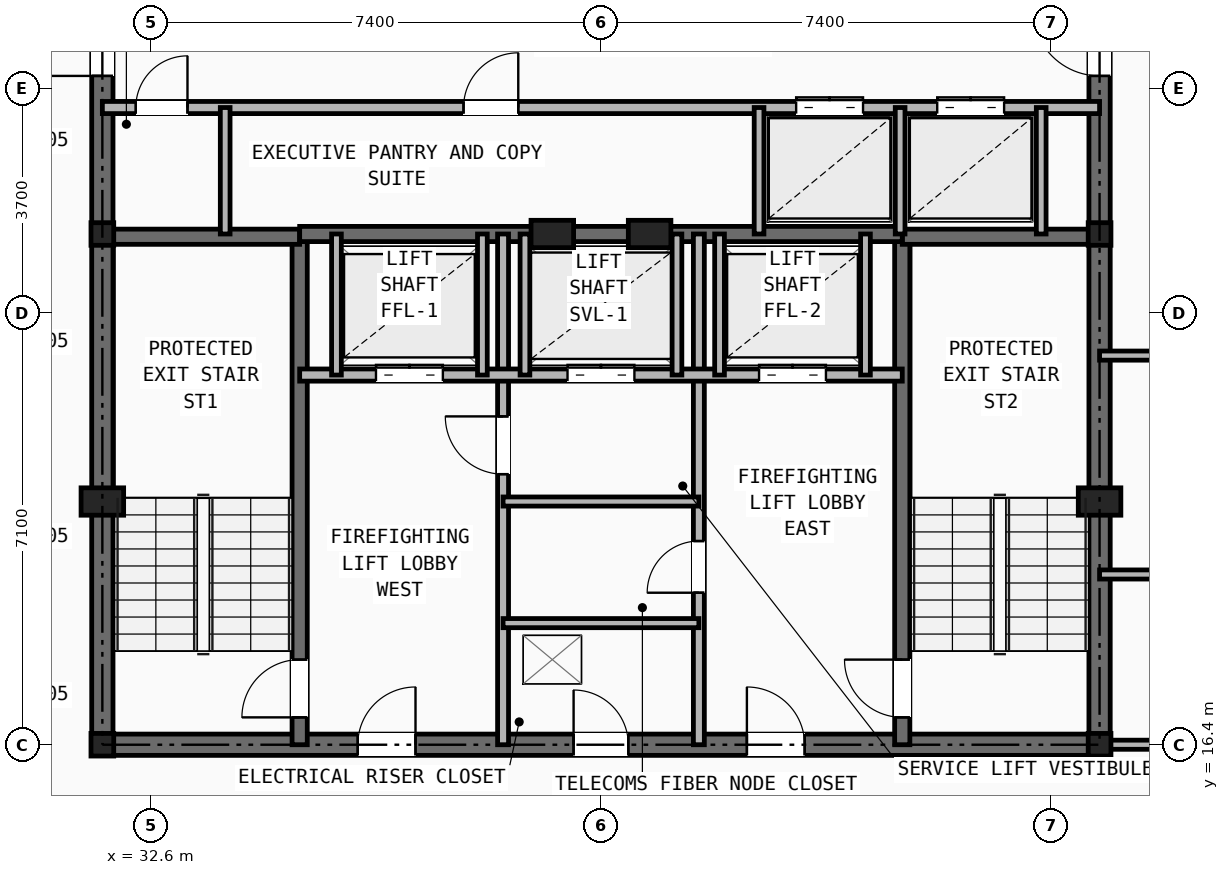
"""IFC4 building model, lengths in metres.
Left out: names, types, materials, properties, quantities, classifications, styles, units other than length and angle.
Written with IfcOpenShell. Run it as: python <this file> out.ifc"""

import sys

from ifc_helpers import new_model, si_unit, direction, frame, frame_2d, origin, origin_2d, place, context, subcontext, project, spatial, rectangle, i_section, extrude, element, fill, save


model = new_model("IFC4")
c1 = context("Model", 3, precision=1e-05, world=origin(), true_north=direction((0.0, 1.0)))
c2 = subcontext(c1, "Body", "Model", "MODEL_VIEW")
j1 = project(units=[si_unit("LENGTHUNIT", "METRE"), si_unit("PLANEANGLEUNIT", "RADIAN")], contexts=[c1])
p1 = place(None, origin())
s1 = spatial("IfcSite", under=j1, at=p1, CompositionType="ELEMENT")
p2 = place(p1, origin())
s2 = spatial("IfcBuilding", under=s1, at=p2, CompositionType="ELEMENT")
p3 = place(p2, frame((0.0, 0.0, 258.5)))
s3 = spatial("IfcBuildingStorey", under=s2, at=p3, CompositionType="ELEMENT", Elevation=258.5)
for number, where, z_axis, x_axis in (
    (1, (31.8, 16.4, 0.0), (0.0, 0.0, 1.0), (1.0, 0.0, 0.0)),
    (2, (48.2, 16.4, 0.0), (0.0, 0.0, 1.0), (1.0, 0.0, 0.0)),
    (3, (31.8, 24.8, 0.0), (0.0, 0.0, 1.0), (1.0, 0.0, 0.0)),
    (4, (48.2, 24.8, 0.0), (0.0, 0.0, 1.0), (1.0, 0.0, 0.0)),
):
    element("IfcColumn", number, at=place(p3, frame(where, z_axis=z_axis, x_axis=x_axis)), inside=s3, PredefinedType="COLUMN", context=c2, shape_type="SweptSolid", body=[
        extrude(i_section(OverallWidth=0.374, OverallDepth=0.372, WebThickness=0.016, FlangeThickness=0.026, at=origin_2d()), origin(), (0.0, 0.0, 1.0), 3.5),
    ])
for number, where, z_axis, x_axis in (
    (5, (31.8, 20.4, 0.0), (0.0, 0.0, 1.0), (1.0, 0.0, 0.0)),
    (6, (48.2, 20.4, 0.0), (0.0, 0.0, 1.0), (1.0, 0.0, 0.0)),
    (7, (39.2, 24.8, 0.0), (0.0, 0.0, 1.0), (1.0, 0.0, 0.0)),
    (8, (40.8, 24.8, 0.0), (0.0, 0.0, 1.0), (1.0, 0.0, 0.0)),
):
    element("IfcColumn", number, at=place(p3, frame(where, z_axis=z_axis, x_axis=x_axis)), inside=s3, PredefinedType="PILASTER", context=c2, shape_type="SweptSolid", body=[
        extrude(rectangle(XDim=0.7, YDim=0.45, at=origin_2d()), origin(), (0.0, 0.0, 1.0), 3.5),
    ])
p4 = place(p3, frame((31.8, 16.4, 0.0), z_axis=(0.0, 0.0, 1.0), x_axis=(1.0, 0.0, 0.0)))
e9 = element("IfcWall", 9, at=p4, inside=s3, PredefinedType="SHEAR", context=c2, shape_type="SweptSolid", body=[
    extrude(rectangle(XDim=16.4, YDim=0.35, at=frame_2d((8.2, 0.0))), origin(), (0.0, 0.0, 1.0), 3.25),
])
p5 = place(p4, frame((7.75, 0.0, 0.0)))
e10 = element("IfcOpeningElement", 10, at=p5, cuts=e9, PredefinedType="OPENING", context=c2, shape_type="SweptSolid", body=[
    extrude(rectangle(XDim=0.9, YDim=2.1, at=frame_2d((0.45, 1.05))), frame((0.0, 0.185, 0.0), z_axis=(0.0, -1.0, 0.0), x_axis=(1.0, 0.0, 0.0)), (0.0, 0.0, 1.0), 0.37),
])
p6 = place(p4, frame((4.2, 0.0, 0.0)))
e11 = element("IfcOpeningElement", 11, at=p6, cuts=e9, PredefinedType="OPENING", context=c2, shape_type="SweptSolid", body=[
    extrude(rectangle(XDim=0.95, YDim=2.1, at=frame_2d((0.475, 1.05))), frame((0.0, 0.185, 0.0), z_axis=(0.0, -1.0, 0.0), x_axis=(1.0, 0.0, 0.0)), (0.0, 0.0, 1.0), 0.37),
])
p7 = place(p4, frame((10.6, 0.0, 0.0)))
e12 = element("IfcOpeningElement", 12, at=p7, cuts=e9, PredefinedType="OPENING", context=c2, shape_type="SweptSolid", body=[
    extrude(rectangle(XDim=0.95, YDim=2.1, at=frame_2d((0.475, 1.05))), frame((0.0, 0.185, 0.0), z_axis=(0.0, -1.0, 0.0), x_axis=(1.0, 0.0, 0.0)), (0.0, 0.0, 1.0), 0.37),
])
p8 = place(p3, frame((31.8, 16.4, 0.0), z_axis=(0.0, 0.0, 1.0), x_axis=(0.0, 1.0, 0.0)))
e13 = element("IfcWall", 13, at=p8, inside=s3, PredefinedType="SHEAR", context=c2, shape_type="SweptSolid", body=[
    extrude(rectangle(XDim=14.8, YDim=0.35, at=frame_2d((7.4, 0.0))), origin(), (0.0, 0.0, 1.0), 3.25),
])
p9 = place(p8, frame((11.0, 0.0, 0.0)))
e14 = element("IfcOpeningElement", 14, at=p9, cuts=e13, PredefinedType="OPENING", context=c2, shape_type="SweptSolid", body=[
    extrude(rectangle(XDim=1.1, YDim=2.15, at=frame_2d((0.55, 1.075))), frame((0.0, 0.185, 0.0), z_axis=(0.0, -1.0, 0.0), x_axis=(1.0, 0.0, 0.0)), (0.0, 0.0, 1.0), 0.37),
])
p10 = place(p3, frame((48.2, 16.4, 0.0), z_axis=(0.0, 0.0, 1.0), x_axis=(0.0, 1.0, 0.0)))
e15 = element("IfcWall", 15, at=p10, inside=s3, PredefinedType="SHEAR", context=c2, shape_type="SweptSolid", body=[
    extrude(rectangle(XDim=14.8, YDim=0.35, at=frame_2d((7.4, 0.0))), origin(), (0.0, 0.0, 1.0), 3.25),
])
p11 = place(p10, frame((11.0, 0.0, 0.0)))
e16 = element("IfcOpeningElement", 16, at=p11, cuts=e15, PredefinedType="OPENING", context=c2, shape_type="SweptSolid", body=[
    extrude(rectangle(XDim=1.1, YDim=2.15, at=frame_2d((0.55, 1.075))), frame((0.0, 0.185, 0.0), z_axis=(0.0, -1.0, 0.0), x_axis=(1.0, 0.0, 0.0)), (0.0, 0.0, 1.0), 0.37),
])
p12 = place(p3, frame((35.045, 16.4, 0.0), z_axis=(0.0, 0.0, 1.0), x_axis=(0.0, 1.0, 0.0)))
e17 = element("IfcWall", 17, at=p12, inside=s3, PredefinedType="SHEAR", context=c2, shape_type="SweptSolid", body=[
    extrude(rectangle(XDim=8.4, YDim=0.25, at=frame_2d((4.2, 0.0))), origin(), (0.0, 0.0, 1.0), 3.25),
])
p13 = place(p12, frame((0.45, 0.0, 0.0)))
e18 = element("IfcOpeningElement", 18, at=p13, cuts=e17, PredefinedType="OPENING", context=c2, shape_type="SweptSolid", body=[
    extrude(rectangle(XDim=0.95, YDim=2.1, at=frame_2d((0.475, 1.05))), frame((0.0, 0.135, 0.0), z_axis=(0.0, -1.0, 0.0), x_axis=(1.0, 0.0, 0.0)), (0.0, 0.0, 1.0), 0.27),
])
p14 = place(p3, frame((31.8, 24.755, 0.0), z_axis=(0.0, 0.0, 1.0), x_axis=(1.0, 0.0, 0.0)))
e19 = element("IfcWall", 19, at=p14, inside=s3, PredefinedType="SHEAR", context=c2, shape_type="SweptSolid", body=[
    extrude(rectangle(XDim=3.245, YDim=0.25, at=frame_2d((1.623, 0.0))), origin(), (0.0, 0.0, 1.0), 3.25),
])
p15 = place(p3, frame((44.955, 16.4, 0.0), z_axis=(0.0, 0.0, 1.0), x_axis=(0.0, 1.0, 0.0)))
e20 = element("IfcWall", 20, at=p15, inside=s3, PredefinedType="SHEAR", context=c2, shape_type="SweptSolid", body=[
    extrude(rectangle(XDim=8.4, YDim=0.25, at=frame_2d((4.2, 0.0))), origin(), (0.0, 0.0, 1.0), 3.25),
])
p16 = place(p15, frame((0.45, 0.0, 0.0)))
e21 = element("IfcOpeningElement", 21, at=p16, cuts=e20, PredefinedType="OPENING", context=c2, shape_type="SweptSolid", body=[
    extrude(rectangle(XDim=0.95, YDim=2.1, at=frame_2d((0.475, 1.05))), frame((0.0, 0.135, 0.0), z_axis=(0.0, -1.0, 0.0), x_axis=(1.0, 0.0, 0.0)), (0.0, 0.0, 1.0), 0.27),
])
p17 = place(p3, frame((44.955, 24.755, 0.0), z_axis=(0.0, 0.0, 1.0), x_axis=(1.0, 0.0, 0.0)))
e22 = element("IfcWall", 22, at=p17, inside=s3, PredefinedType="SHEAR", context=c2, shape_type="SweptSolid", body=[
    extrude(rectangle(XDim=3.245, YDim=0.25, at=frame_2d((1.623, 0.0))), origin(), (0.0, 0.0, 1.0), 3.25),
])
p18 = place(p3, frame((35.045, 24.8, 0.0), z_axis=(0.0, 0.0, 1.0), x_axis=(1.0, 0.0, 0.0)))
e23 = element("IfcWall", 23, at=p18, inside=s3, PredefinedType="SHEAR", context=c2, shape_type="SweptSolid", body=[
    extrude(rectangle(XDim=9.91, YDim=0.25, at=frame_2d((4.955, 0.0))), origin(), (0.0, 0.0, 1.0), 3.25),
])
p19 = place(p3, frame((38.39, 16.4, 0.0), z_axis=(0.0, 0.0, 1.0), x_axis=(0.0, 1.0, 0.0)))
e24 = element("IfcWall", 24, at=p19, inside=s3, PredefinedType="PARTITIONING", context=c2, shape_type="SweptSolid", body=[
    extrude(rectangle(XDim=8.4, YDim=0.18, at=frame_2d((4.2, 0.0))), origin(), (0.0, 0.0, 1.0), 2.705),
])
p20 = place(p19, frame((4.45, 0.0, 0.0)))
e25 = element("IfcOpeningElement", 25, at=p20, cuts=e24, PredefinedType="OPENING", context=c2, shape_type="SweptSolid", body=[
    extrude(rectangle(XDim=0.95, YDim=2.1, at=frame_2d((0.475, 1.05))), frame((0.0, 0.1, 0.0), z_axis=(0.0, -1.0, 0.0), x_axis=(1.0, 0.0, 0.0)), (0.0, 0.0, 1.0), 0.2),
])
p21 = place(p3, frame((41.61, 16.4, 0.0), z_axis=(0.0, 0.0, 1.0), x_axis=(0.0, 1.0, 0.0)))
e26 = element("IfcWall", 26, at=p21, inside=s3, PredefinedType="PARTITIONING", context=c2, shape_type="SweptSolid", body=[
    extrude(rectangle(XDim=8.4, YDim=0.18, at=frame_2d((4.2, 0.0))), origin(), (0.0, 0.0, 1.0), 2.705),
])
p22 = place(p21, frame((2.5, 0.0, 0.0)))
e27 = element("IfcOpeningElement", 27, at=p22, cuts=e26, PredefinedType="OPENING", context=c2, shape_type="SweptSolid", body=[
    extrude(rectangle(XDim=0.85, YDim=2.05, at=frame_2d((0.425, 1.025))), frame((0.0, 0.1, 0.0), z_axis=(0.0, -1.0, 0.0), x_axis=(1.0, 0.0, 0.0)), (0.0, 0.0, 1.0), 0.2),
])
p23 = place(p3, frame((35.045, 22.48, 0.0), z_axis=(0.0, 0.0, 1.0), x_axis=(1.0, 0.0, 0.0)))
e28 = element("IfcWall", 28, at=p23, inside=s3, PredefinedType="SOLIDWALL", context=c2, shape_type="SweptSolid", body=[
    extrude(rectangle(XDim=9.91, YDim=0.2, at=frame_2d((4.955, 0.0))), origin(), (0.0, 0.0, 1.0), 3.25),
])
p24 = place(p23, frame((1.255, 0.0, 0.0)))
e29 = element("IfcOpeningElement", 29, at=p24, cuts=e28, PredefinedType="OPENING", context=c2, shape_type="SweptSolid", body=[
    extrude(rectangle(XDim=1.1, YDim=2.15, at=frame_2d((0.55, 1.075))), frame((0.0, 0.11, 0.0), z_axis=(0.0, -1.0, 0.0), x_axis=(1.0, 0.0, 0.0)), (0.0, 0.0, 1.0), 0.22),
])
p25 = place(p23, frame((7.555, 0.0, 0.0)))
e30 = element("IfcOpeningElement", 30, at=p25, cuts=e28, PredefinedType="OPENING", context=c2, shape_type="SweptSolid", body=[
    extrude(rectangle(XDim=1.1, YDim=2.15, at=frame_2d((0.55, 1.075))), frame((0.0, 0.11, 0.0), z_axis=(0.0, -1.0, 0.0), x_axis=(1.0, 0.0, 0.0)), (0.0, 0.0, 1.0), 0.22),
])
p26 = place(p23, frame((4.405, 0.0, 0.0)))
e31 = element("IfcOpeningElement", 31, at=p26, cuts=e28, PredefinedType="OPENING", context=c2, shape_type="SweptSolid", body=[
    extrude(rectangle(XDim=1.1, YDim=2.15, at=frame_2d((0.55, 1.075))), frame((0.0, 0.11, 0.0), z_axis=(0.0, -1.0, 0.0), x_axis=(1.0, 0.0, 0.0)), (0.0, 0.0, 1.0), 0.22),
])
for number, where, z_axis, x_axis in (
    (32, (38.39, 18.4, 0.0), (0.0, 0.0, 1.0), (1.0, 0.0, 0.0)),
    (33, (38.39, 20.4, 0.0), (0.0, 0.0, 1.0), (1.0, 0.0, 0.0)),
):
    element("IfcWall", number, at=place(p3, frame(where, z_axis=z_axis, x_axis=x_axis)), inside=s3, PredefinedType="PARTITIONING", context=c2, shape_type="SweptSolid", body=[
        extrude(rectangle(XDim=3.22, YDim=0.15, at=frame_2d((1.61, 0.0))), origin(), (0.0, 0.0, 1.0), 3.25),
    ])
for number, where, z_axis, x_axis in (
    (34, (35.65, 22.48, 0.0), (0.0, 0.0, 1.0), (0.0, 1.0, 0.0)),
    (35, (38.05, 22.48, 0.0), (0.0, 0.0, 1.0), (0.0, 1.0, 0.0)),
    (36, (41.95, 22.48, 0.0), (0.0, 0.0, 1.0), (0.0, 1.0, 0.0)),
    (37, (44.35, 22.48, 0.0), (0.0, 0.0, 1.0), (0.0, 1.0, 0.0)),
    (38, (38.75, 22.48, 0.0), (0.0, 0.0, 1.0), (0.0, 1.0, 0.0)),
    (39, (41.25, 22.48, 0.0), (0.0, 0.0, 1.0), (0.0, 1.0, 0.0)),
):
    element("IfcWall", number, at=place(p3, frame(where, z_axis=z_axis, x_axis=x_axis)), inside=s3, PredefinedType="SOLIDWALL", context=c2, shape_type="SweptSolid", body=[
        extrude(rectangle(XDim=2.32, YDim=0.16, at=frame_2d((1.16, 0.0))), origin(), (0.0, 0.0, 1.0), 3.25),
    ])
p27 = place(p3, frame((31.8, 26.88, 0.0), z_axis=(0.0, 0.0, 1.0), x_axis=(1.0, 0.0, 0.0)))
e40 = element("IfcWall", 40, at=p27, inside=s3, PredefinedType="SOLIDWALL", context=c2, shape_type="SweptSolid", body=[
    extrude(rectangle(XDim=16.4, YDim=0.2, at=frame_2d((8.2, 0.0))), origin(), (0.0, 0.0, 1.0), 2.705),
])
p28 = place(p27, frame((0.55, 0.0, 0.0)))
e41 = element("IfcOpeningElement", 41, at=p28, cuts=e40, PredefinedType="OPENING", context=c2, shape_type="SweptSolid", body=[
    extrude(rectangle(XDim=0.85, YDim=2.05, at=frame_2d((0.425, 1.025))), frame((0.0, 0.11, 0.0), z_axis=(0.0, -1.0, 0.0), x_axis=(1.0, 0.0, 0.0)), (0.0, 0.0, 1.0), 0.22),
])
p29 = place(p27, frame((5.94, 0.0, 0.0)))
e42 = element("IfcOpeningElement", 42, at=p29, cuts=e40, PredefinedType="OPENING", context=c2, shape_type="SweptSolid", body=[
    extrude(rectangle(XDim=0.9, YDim=2.1, at=frame_2d((0.45, 1.05))), frame((0.0, 0.11, 0.0), z_axis=(0.0, -1.0, 0.0), x_axis=(1.0, 0.0, 0.0)), (0.0, 0.0, 1.0), 0.22),
])
p30 = place(p27, frame((11.41, 0.0, 0.0)))
e43 = element("IfcOpeningElement", 43, at=p30, cuts=e40, PredefinedType="OPENING", context=c2, shape_type="SweptSolid", body=[
    extrude(rectangle(XDim=1.1, YDim=2.15, at=frame_2d((0.55, 1.075))), frame((0.0, 0.11, 0.0), z_axis=(0.0, -1.0, 0.0), x_axis=(1.0, 0.0, 0.0)), (0.0, 0.0, 1.0), 0.22),
])
p31 = place(p27, frame((13.73, 0.0, 0.0)))
e44 = element("IfcOpeningElement", 44, at=p31, cuts=e40, PredefinedType="OPENING", context=c2, shape_type="SweptSolid", body=[
    extrude(rectangle(XDim=1.1, YDim=2.15, at=frame_2d((0.55, 1.075))), frame((0.0, 0.11, 0.0), z_axis=(0.0, -1.0, 0.0), x_axis=(1.0, 0.0, 0.0)), (0.0, 0.0, 1.0), 0.22),
])
for number, where, z_axis, x_axis in (
    (45, (33.82, 24.8, 0.0), (0.0, 0.0, 1.0), (0.0, 1.0, 0.0)),
    (46, (42.6, 24.8, 0.0), (0.0, 0.0, 1.0), (0.0, 1.0, 0.0)),
    (47, (44.92, 24.8, 0.0), (0.0, 0.0, 1.0), (0.0, 1.0, 0.0)),
    (48, (47.24, 24.8, 0.0), (0.0, 0.0, 1.0), (0.0, 1.0, 0.0)),
):
    element("IfcWall", number, at=place(p3, frame(where, z_axis=z_axis, x_axis=x_axis)), inside=s3, PredefinedType="SOLIDWALL", context=c2, shape_type="SweptSolid", body=[
        extrude(rectangle(XDim=2.08, YDim=0.16, at=frame_2d((1.04, 0.0))), origin(), (0.0, 0.0, 1.0), 3.25),
    ])
p32 = place(p3, frame((48.2, 16.4, 0.0), z_axis=(0.0, 0.0, 1.0), x_axis=(1.0, 0.0, 0.0)))
e49 = element("IfcWall", 49, at=p32, inside=s3, PredefinedType="PARTITIONING", context=c2, shape_type="SweptSolid", body=[
    extrude(rectangle(XDim=15.289, YDim=0.15, at=frame_2d((7.644, 0.0))), origin(), (0.0, 0.0, 1.0), 2.292),
])
p33 = place(p3, frame((48.2, 19.2, 0.0), z_axis=(0.0, 0.0, 1.0), x_axis=(1.0, 0.0, 0.0)))
e50 = element("IfcWall", 50, at=p33, inside=s3, PredefinedType="PARTITIONING", context=c2, shape_type="SweptSolid", body=[
    extrude(rectangle(XDim=13.268, YDim=0.15, at=frame_2d((6.634, 0.0))), origin(), (0.0, 0.0, 1.0), 2.292),
])
p34 = place(p33, frame((1.4, 0.0, 0.0)))
e51 = element("IfcOpeningElement", 51, at=p34, cuts=e50, PredefinedType="OPENING", context=c2, shape_type="SweptSolid", body=[
    extrude(rectangle(XDim=0.95, YDim=2.1, at=frame_2d((0.475, 1.05))), frame((0.0, 0.085, 0.0), z_axis=(0.0, -1.0, 0.0), x_axis=(1.0, 0.0, 0.0)), (0.0, 0.0, 1.0), 0.17),
])
p35 = place(p3, frame((48.2, 22.8, 0.0), z_axis=(0.0, 0.0, 1.0), x_axis=(1.0, 0.0, 0.0)))
e52 = element("IfcWall", 52, at=p35, inside=s3, PredefinedType="PARTITIONING", context=c2, shape_type="SweptSolid", body=[
    extrude(rectangle(XDim=10.67, YDim=0.15, at=frame_2d((5.335, 0.0))), origin(), (0.0, 0.0, 1.0), 2.628),
])
p36 = place(p35, frame((1.4, 0.0, 0.0)))
e53 = element("IfcOpeningElement", 53, at=p36, cuts=e52, PredefinedType="OPENING", context=c2, shape_type="SweptSolid", body=[
    extrude(rectangle(XDim=0.95, YDim=2.1, at=frame_2d((0.475, 1.05))), frame((0.0, 0.085, 0.0), z_axis=(0.0, -1.0, 0.0), x_axis=(1.0, 0.0, 0.0)), (0.0, 0.0, 1.0), 0.17),
])
p37 = place(p5, origin())
e54 = element("IfcDoor", 54, at=p37, inside=s3, OperationType="SINGLE_SWING_LEFT", PredefinedType="DOOR", context=c2, shape_type="SweptSolid", body=[
    extrude(rectangle(XDim=0.9, YDim=2.1, at=frame_2d((0.45, 1.05))), frame((0.0, 0.025, 0.0), z_axis=(0.0, -1.0, 0.0), x_axis=(1.0, 0.0, 0.0)), (0.0, 0.0, 1.0), 0.05),
])
fill(e10, e54)
p38 = place(p22, origin())
e55 = element("IfcDoor", 55, at=p38, inside=s3, OperationType="SINGLE_SWING_LEFT", PredefinedType="DOOR", context=c2, shape_type="SweptSolid", body=[
    extrude(rectangle(XDim=0.85, YDim=2.05, at=frame_2d((0.425, 1.025))), frame((0.0, 0.025, 0.0), z_axis=(0.0, -1.0, 0.0), x_axis=(1.0, 0.0, 0.0)), (0.0, 0.0, 1.0), 0.05),
])
fill(e27, e55)
p39 = place(p20, origin())
e56 = element("IfcDoor", 56, at=p39, inside=s3, OperationType="SINGLE_SWING_RIGHT", PredefinedType="DOOR", context=c2, shape_type="SweptSolid", body=[
    extrude(rectangle(XDim=0.95, YDim=2.1, at=frame_2d((0.475, 1.05))), frame((0.0, 0.025, 0.0), z_axis=(0.0, -1.0, 0.0), x_axis=(1.0, 0.0, 0.0)), (0.0, 0.0, 1.0), 0.05),
])
fill(e25, e56)
p40 = place(p13, origin())
e57 = element("IfcDoor", 57, at=p40, inside=s3, OperationType="SINGLE_SWING_LEFT", PredefinedType="DOOR", context=c2, shape_type="SweptSolid", body=[
    extrude(rectangle(XDim=0.95, YDim=2.1, at=frame_2d((0.475, 1.05))), frame((0.0, 0.025, 0.0), z_axis=(0.0, -1.0, 0.0), x_axis=(1.0, 0.0, 0.0)), (0.0, 0.0, 1.0), 0.05),
])
fill(e18, e57)
p41 = place(p16, origin())
e58 = element("IfcDoor", 58, at=p41, inside=s3, OperationType="SINGLE_SWING_RIGHT", PredefinedType="DOOR", context=c2, shape_type="SweptSolid", body=[
    extrude(rectangle(XDim=0.95, YDim=2.1, at=frame_2d((0.475, 1.05))), frame((0.0, 0.025, 0.0), z_axis=(0.0, -1.0, 0.0), x_axis=(1.0, 0.0, 0.0)), (0.0, 0.0, 1.0), 0.05),
])
fill(e21, e58)
p42 = place(p6, origin())
e59 = element("IfcDoor", 59, at=p42, inside=s3, OperationType="SINGLE_SWING_RIGHT", PredefinedType="DOOR", context=c2, shape_type="SweptSolid", body=[
    extrude(rectangle(XDim=0.95, YDim=2.1, at=frame_2d((0.475, 1.05))), frame((0.0, 0.025, 0.0), z_axis=(0.0, -1.0, 0.0), x_axis=(1.0, 0.0, 0.0)), (0.0, 0.0, 1.0), 0.05),
])
fill(e11, e59)
p43 = place(p7, origin())
e60 = element("IfcDoor", 60, at=p43, inside=s3, OperationType="SINGLE_SWING_LEFT", PredefinedType="DOOR", context=c2, shape_type="SweptSolid", body=[
    extrude(rectangle(XDim=0.95, YDim=2.1, at=frame_2d((0.475, 1.05))), frame((0.0, 0.025, 0.0), z_axis=(0.0, -1.0, 0.0), x_axis=(1.0, 0.0, 0.0)), (0.0, 0.0, 1.0), 0.05),
])
fill(e12, e60)
p44 = place(p24, origin())
e61 = element("IfcDoor", 61, at=p44, inside=s3, OperationType="DOUBLE_DOOR_SLIDING", PredefinedType="DOOR", context=c2, shape_type="SweptSolid", body=[
    extrude(rectangle(XDim=1.1, YDim=2.15, at=frame_2d((0.55, 1.075))), frame((0.0, 0.025, 0.0), z_axis=(0.0, -1.0, 0.0), x_axis=(1.0, 0.0, 0.0)), (0.0, 0.0, 1.0), 0.05),
])
fill(e29, e61)
p45 = place(p25, origin())
e62 = element("IfcDoor", 62, at=p45, inside=s3, OperationType="DOUBLE_DOOR_SLIDING", PredefinedType="DOOR", context=c2, shape_type="SweptSolid", body=[
    extrude(rectangle(XDim=1.1, YDim=2.15, at=frame_2d((0.55, 1.075))), frame((0.0, 0.025, 0.0), z_axis=(0.0, -1.0, 0.0), x_axis=(1.0, 0.0, 0.0)), (0.0, 0.0, 1.0), 0.05),
])
fill(e30, e62)
p46 = place(p26, origin())
e63 = element("IfcDoor", 63, at=p46, inside=s3, OperationType="DOUBLE_DOOR_SLIDING", PredefinedType="DOOR", context=c2, shape_type="SweptSolid", body=[
    extrude(rectangle(XDim=1.1, YDim=2.15, at=frame_2d((0.55, 1.075))), frame((0.0, 0.025, 0.0), z_axis=(0.0, -1.0, 0.0), x_axis=(1.0, 0.0, 0.0)), (0.0, 0.0, 1.0), 0.05),
])
fill(e31, e63)
p47 = place(p28, origin())
e64 = element("IfcDoor", 64, at=p47, inside=s3, OperationType="SINGLE_SWING_RIGHT", PredefinedType="DOOR", context=c2, shape_type="SweptSolid", body=[
    extrude(rectangle(XDim=0.85, YDim=2.05, at=frame_2d((0.425, 1.025))), frame((0.0, 0.025, 0.0), z_axis=(0.0, -1.0, 0.0), x_axis=(1.0, 0.0, 0.0)), (0.0, 0.0, 1.0), 0.05),
])
fill(e41, e64)
p48 = place(p9, origin())
e65 = element("IfcDoor", 65, at=p48, inside=s3, OperationType="SINGLE_SWING_LEFT", PredefinedType="DOOR", context=c2, shape_type="SweptSolid", body=[
    extrude(rectangle(XDim=1.1, YDim=2.15, at=frame_2d((0.55, 1.075))), frame((0.0, 0.025, 0.0), z_axis=(0.0, -1.0, 0.0), x_axis=(1.0, 0.0, 0.0)), (0.0, 0.0, 1.0), 0.05),
])
fill(e14, e65)
p49 = place(p11, origin())
e66 = element("IfcDoor", 66, at=p49, inside=s3, OperationType="SINGLE_SWING_RIGHT", PredefinedType="DOOR", context=c2, shape_type="SweptSolid", body=[
    extrude(rectangle(XDim=1.1, YDim=2.15, at=frame_2d((0.55, 1.075))), frame((0.0, 0.025, 0.0), z_axis=(0.0, -1.0, 0.0), x_axis=(1.0, 0.0, 0.0)), (0.0, 0.0, 1.0), 0.05),
])
fill(e16, e66)
p50 = place(p29, origin())
e67 = element("IfcDoor", 67, at=p50, inside=s3, OperationType="SINGLE_SWING_RIGHT", PredefinedType="DOOR", context=c2, shape_type="SweptSolid", body=[
    extrude(rectangle(XDim=0.9, YDim=2.1, at=frame_2d((0.45, 1.05))), frame((0.0, 0.025, 0.0), z_axis=(0.0, -1.0, 0.0), x_axis=(1.0, 0.0, 0.0)), (0.0, 0.0, 1.0), 0.05),
])
fill(e42, e67)
p51 = place(p30, origin())
e68 = element("IfcDoor", 68, at=p51, inside=s3, OperationType="DOUBLE_DOOR_SLIDING", PredefinedType="DOOR", context=c2, shape_type="SweptSolid", body=[
    extrude(rectangle(XDim=1.1, YDim=2.15, at=frame_2d((0.55, 1.075))), frame((0.0, 0.025, 0.0), z_axis=(0.0, -1.0, 0.0), x_axis=(1.0, 0.0, 0.0)), (0.0, 0.0, 1.0), 0.05),
])
fill(e43, e68)
p52 = place(p31, origin())
e69 = element("IfcDoor", 69, at=p52, inside=s3, OperationType="DOUBLE_DOOR_SLIDING", PredefinedType="DOOR", context=c2, shape_type="SweptSolid", body=[
    extrude(rectangle(XDim=1.1, YDim=2.15, at=frame_2d((0.55, 1.075))), frame((0.0, 0.025, 0.0), z_axis=(0.0, -1.0, 0.0), x_axis=(1.0, 0.0, 0.0)), (0.0, 0.0, 1.0), 0.05),
])
fill(e44, e69)
save(model, sys.argv[1])
